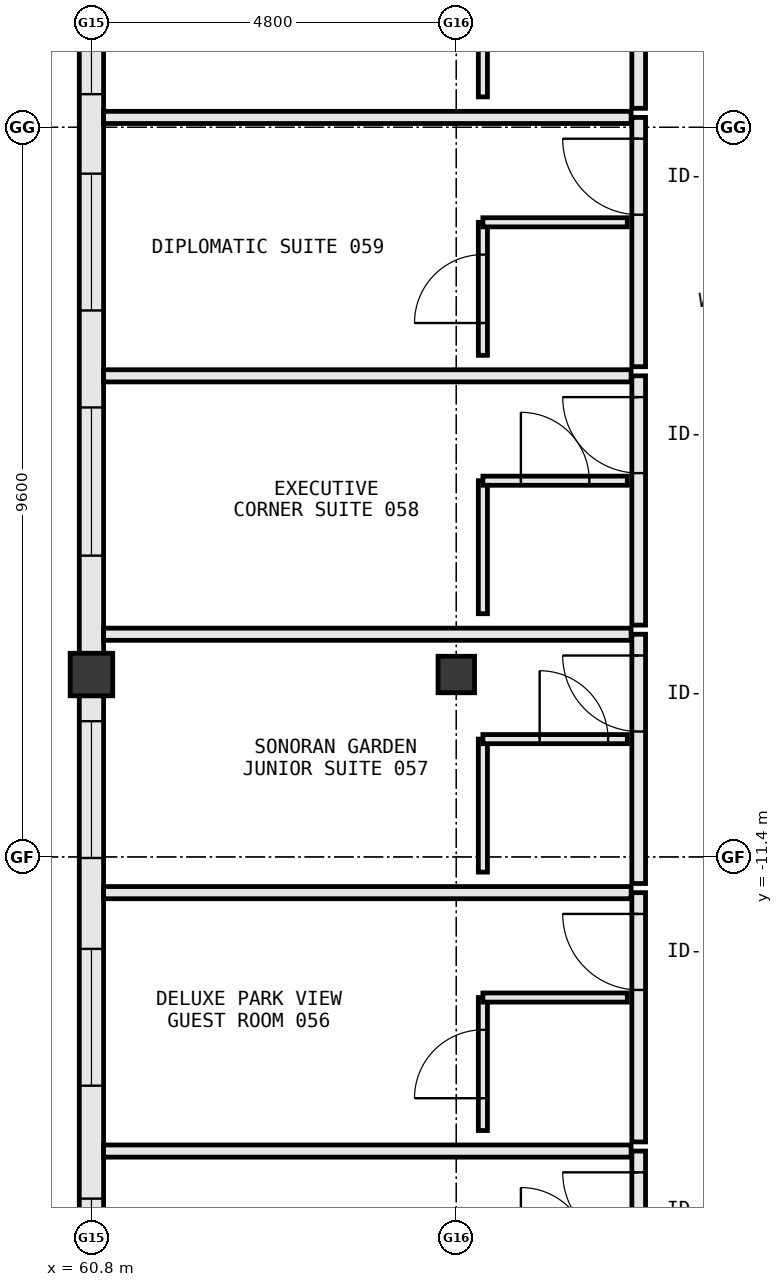
"""IFC4 building model, lengths in metres.
Left out: names, types, materials, properties, quantities, classifications, styles, units other than length and angle.
Written with IfcOpenShell. Run it as: python <this file> out.ifc"""

import sys

from ifc_helpers import new_model, si_unit, direction, frame, frame_2d, origin, origin_2d, place, context, subcontext, project, spatial, rectangle, extrude, element, fill, save


model = new_model("IFC4")
c1 = context("Model", 3, precision=1e-05, world=origin(), true_north=direction((0.0, 1.0)))
c2 = subcontext(c1, "Body", "Model", "MODEL_VIEW")
j1 = project(units=[si_unit("LENGTHUNIT", "METRE"), si_unit("PLANEANGLEUNIT", "RADIAN")], contexts=[c1])
p1 = place(None, origin())
s1 = spatial("IfcSite", under=j1, at=p1, CompositionType="ELEMENT")
p2 = place(p1, origin())
s2 = spatial("IfcBuilding", under=s1, at=p2, CompositionType="ELEMENT")
p3 = place(p2, frame((0.0, 0.0, 16.2)))
s3 = spatial("IfcBuildingStorey", under=s2, at=p3, CompositionType="ELEMENT", Elevation=16.2)
p4 = place(p3, frame((60.8, -9.0, 0.0), z_axis=(0.0, 0.0, 1.0), x_axis=(1.0, 0.0, 0.0)))
e1 = element("IfcColumn", 1, at=p4, inside=s3, PredefinedType="COLUMN", context=c2, shape_type="SweptSolid", body=[
    extrude(rectangle(XDim=0.56, YDim=0.56, at=origin_2d()), origin(), (0.0, 0.0, 1.0), 3.8),
])
p5 = place(p3, frame((65.6, -9.0, 0.0), z_axis=(0.0, 0.0, 1.0), x_axis=(1.0, 0.0, 0.0)))
e2 = element("IfcColumn", 2, at=p5, inside=s3, PredefinedType="COLUMN", context=c2, shape_type="SweptSolid", body=[
    extrude(rectangle(XDim=0.48, YDim=0.48, at=origin_2d()), origin(), (0.0, 0.0, 1.0), 3.8),
])
p6 = place(p3, frame((60.8, 0.322, 0.0), z_axis=(0.0, 0.0, 1.0), x_axis=(0.0, -1.0, 0.0)))
e3 = element("IfcWall", 3, at=p6, inside=s3, PredefinedType="STANDARD", context=c2, shape_type="SweptSolid", body=[
    extrude(rectangle(XDim=9.044, YDim=0.32, at=frame_2d((4.522, 0.0))), origin(), (0.0, 0.0, 1.0), 2.915),
])
p7 = place(p6, frame((5.808, 0.0, 0.85)))
e4 = element("IfcOpeningElement", 4, at=p7, cuts=e3, PredefinedType="OPENING", context=c2, shape_type="SweptSolid", body=[
    extrude(rectangle(XDim=1.95, YDim=1.9, at=frame_2d((0.975, 0.95))), frame((0.0, 0.172, 0.0), z_axis=(0.0, -1.0, 0.0), x_axis=(1.0, 0.0, 0.0)), (0.0, 0.0, 1.0), 0.344),
])
p8 = place(p6, frame((2.732, 0.0, 0.85)))
e5 = element("IfcOpeningElement", 5, at=p8, cuts=e3, PredefinedType="OPENING", context=c2, shape_type="SweptSolid", body=[
    extrude(rectangle(XDim=1.8, YDim=1.85, at=frame_2d((0.9, 0.925))), frame((0.0, 0.172, 0.0), z_axis=(0.0, -1.0, 0.0), x_axis=(1.0, 0.0, 0.0)), (0.0, 0.0, 1.0), 0.344),
])
p9 = place(p6, frame((0.186, 0.0, 0.85)))
e6 = element("IfcOpeningElement", 6, at=p9, cuts=e3, PredefinedType="OPENING", context=c2, shape_type="SweptSolid", body=[
    extrude(rectangle(XDim=1.5, YDim=1.75, at=frame_2d((0.75, 0.875))), frame((0.0, 0.172, 0.0), z_axis=(0.0, -1.0, 0.0), x_axis=(1.0, 0.0, 0.0)), (0.0, 0.0, 1.0), 0.344),
])
p10 = place(p3, frame((60.8, -9.278, 0.0), z_axis=(0.0, 0.0, 1.0), x_axis=(0.0, -1.0, 0.0)))
e7 = element("IfcWall", 7, at=p10, inside=s3, PredefinedType="STANDARD", context=c2, shape_type="SweptSolid", body=[
    extrude(rectangle(XDim=9.044, YDim=0.32, at=frame_2d((4.522, 0.0))), origin(), (0.0, 0.0, 1.0), 2.915),
])
p11 = place(p10, frame((6.618, 0.0, 0.85)))
e8 = element("IfcOpeningElement", 8, at=p11, cuts=e7, PredefinedType="OPENING", context=c2, shape_type="SweptSolid", body=[
    extrude(rectangle(XDim=1.8, YDim=1.85, at=frame_2d((0.9, 0.925))), frame((0.0, 0.172, 0.0), z_axis=(0.0, -1.0, 0.0), x_axis=(1.0, 0.0, 0.0)), (0.0, 0.0, 1.0), 0.344),
])
p12 = place(p10, frame((3.332, 0.0, 0.85)))
e9 = element("IfcOpeningElement", 9, at=p12, cuts=e7, PredefinedType="OPENING", context=c2, shape_type="SweptSolid", body=[
    extrude(rectangle(XDim=1.8, YDim=1.85, at=frame_2d((0.9, 0.925))), frame((0.0, 0.172, 0.0), z_axis=(0.0, -1.0, 0.0), x_axis=(1.0, 0.0, 0.0)), (0.0, 0.0, 1.0), 0.344),
])
p13 = place(p10, frame((0.336, 0.0, 0.85)))
e10 = element("IfcOpeningElement", 10, at=p13, cuts=e7, PredefinedType="OPENING", context=c2, shape_type="SweptSolid", body=[
    extrude(rectangle(XDim=1.8, YDim=1.85, at=frame_2d((0.9, 0.925))), frame((0.0, 0.172, 0.0), z_axis=(0.0, -1.0, 0.0), x_axis=(1.0, 0.0, 0.0)), (0.0, 0.0, 1.0), 0.344),
])
p14 = place(p3, frame((68.0, -18.55, 0.0), z_axis=(0.0, 0.0, 1.0), x_axis=(0.0, 1.0, 0.0)))
e11 = element("IfcWall", 11, at=p14, inside=s3, PredefinedType="PARTITIONING", context=c2, shape_type="SweptSolid", body=[
    extrude(rectangle(XDim=3.28, YDim=0.18, at=frame_2d((1.64, 0.0))), origin(), (0.0, 0.0, 1.0), 3.56),
])
p15 = place(p14, frame((2.0, 0.0, 0.0)))
e12 = element("IfcOpeningElement", 12, at=p15, cuts=e11, PredefinedType="OPENING", context=c2, shape_type="SweptSolid", body=[
    extrude(rectangle(XDim=1.0, YDim=2.2, at=frame_2d((0.5, 1.1))), frame((0.0, 0.102, 0.0), z_axis=(0.0, -1.0, 0.0), x_axis=(1.0, 0.0, 0.0)), (0.0, 0.0, 1.0), 0.204),
])
p16 = place(p3, frame((60.96, -15.27, 0.0), z_axis=(0.0, 0.0, 1.0), x_axis=(1.0, 0.0, 0.0)))
e13 = element("IfcWall", 13, at=p16, inside=s3, PredefinedType="PARTITIONING", context=c2, shape_type="SweptSolid", body=[
    extrude(rectangle(XDim=6.94, YDim=0.16, at=frame_2d((3.47, 0.0))), origin(), (0.0, 0.0, 1.0), 3.56),
])
p17 = place(p3, frame((68.0, -15.15, 0.0), z_axis=(0.0, 0.0, 1.0), x_axis=(0.0, 1.0, 0.0)))
e14 = element("IfcWall", 14, at=p17, inside=s3, PredefinedType="PARTITIONING", context=c2, shape_type="SweptSolid", body=[
    extrude(rectangle(XDim=3.28, YDim=0.18, at=frame_2d((1.64, 0.0))), origin(), (0.0, 0.0, 1.0), 3.56),
])
p18 = place(p17, frame((2.0, 0.0, 0.0)))
e15 = element("IfcOpeningElement", 15, at=p18, cuts=e14, PredefinedType="OPENING", context=c2, shape_type="SweptSolid", body=[
    extrude(rectangle(XDim=1.0, YDim=2.2, at=frame_2d((0.5, 1.1))), frame((0.0, 0.102, 0.0), z_axis=(0.0, -1.0, 0.0), x_axis=(1.0, 0.0, 0.0)), (0.0, 0.0, 1.0), 0.204),
])
p19 = place(p3, frame((60.96, -11.87, 0.0), z_axis=(0.0, 0.0, 1.0), x_axis=(1.0, 0.0, 0.0)))
e16 = element("IfcWall", 16, at=p19, inside=s3, PredefinedType="PARTITIONING", context=c2, shape_type="SweptSolid", body=[
    extrude(rectangle(XDim=6.94, YDim=0.16, at=frame_2d((3.47, 0.0))), origin(), (0.0, 0.0, 1.0), 3.56),
])
p20 = place(p3, frame((65.95, -15.0, 0.0), z_axis=(0.0, 0.0, 1.0), x_axis=(0.0, 1.0, 0.0)))
e17 = element("IfcWall", 17, at=p20, inside=s3, PredefinedType="PARTITIONING", context=c2, shape_type="SweptSolid", body=[
    extrude(rectangle(XDim=1.75, YDim=0.12, at=frame_2d((0.875, 0.0))), origin(), (0.0, 0.0, 1.0), 2.915),
])
p21 = place(p20, frame((0.425, 0.0, 0.0)))
e18 = element("IfcOpeningElement", 18, at=p21, cuts=e17, PredefinedType="OPENING", context=c2, shape_type="SweptSolid", body=[
    extrude(rectangle(XDim=0.9, YDim=2.15, at=frame_2d((0.45, 1.075))), frame((0.0, 0.072, 0.0), z_axis=(0.0, -1.0, 0.0), x_axis=(1.0, 0.0, 0.0)), (0.0, 0.0, 1.0), 0.144),
])
p22 = place(p3, frame((65.95, -13.25, 0.0), z_axis=(0.0, 0.0, 1.0), x_axis=(1.0, 0.0, 0.0)))
e19 = element("IfcWall", 19, at=p22, inside=s3, PredefinedType="PARTITIONING", context=c2, shape_type="SweptSolid", body=[
    extrude(rectangle(XDim=1.9, YDim=0.12, at=frame_2d((0.95, 0.0))), origin(), (0.0, 0.0, 1.0), 3.56),
])
p23 = place(p3, frame((68.0, -11.75, 0.0), z_axis=(0.0, 0.0, 1.0), x_axis=(0.0, 1.0, 0.0)))
e20 = element("IfcWall", 20, at=p23, inside=s3, PredefinedType="PARTITIONING", context=c2, shape_type="SweptSolid", body=[
    extrude(rectangle(XDim=3.28, YDim=0.18, at=frame_2d((1.64, 0.0))), origin(), (0.0, 0.0, 1.0), 3.56),
])
p24 = place(p23, frame((2.0, 0.0, 0.0)))
e21 = element("IfcOpeningElement", 21, at=p24, cuts=e20, PredefinedType="OPENING", context=c2, shape_type="SweptSolid", body=[
    extrude(rectangle(XDim=1.0, YDim=2.2, at=frame_2d((0.5, 1.1))), frame((0.0, 0.102, 0.0), z_axis=(0.0, -1.0, 0.0), x_axis=(1.0, 0.0, 0.0)), (0.0, 0.0, 1.0), 0.204),
])
p25 = place(p3, frame((60.96, -8.47, 0.0), z_axis=(0.0, 0.0, 1.0), x_axis=(1.0, 0.0, 0.0)))
e22 = element("IfcWall", 22, at=p25, inside=s3, PredefinedType="PARTITIONING", context=c2, shape_type="SweptSolid", body=[
    extrude(rectangle(XDim=6.94, YDim=0.16, at=frame_2d((3.47, 0.0))), origin(), (0.0, 0.0, 1.0), 3.56),
])
p26 = place(p3, frame((65.95, -11.6, 0.0), z_axis=(0.0, 0.0, 1.0), x_axis=(0.0, 1.0, 0.0)))
e23 = element("IfcWall", 23, at=p26, inside=s3, PredefinedType="PARTITIONING", context=c2, shape_type="SweptSolid", body=[
    extrude(rectangle(XDim=1.75, YDim=0.12, at=frame_2d((0.875, 0.0))), origin(), (0.0, 0.0, 1.0), 2.915),
])
p27 = place(p3, frame((65.95, -9.85, 0.0), z_axis=(0.0, 0.0, 1.0), x_axis=(1.0, 0.0, 0.0)))
e24 = element("IfcWall", 24, at=p27, inside=s3, PredefinedType="PARTITIONING", context=c2, shape_type="SweptSolid", body=[
    extrude(rectangle(XDim=1.9, YDim=0.12, at=frame_2d((0.95, 0.0))), origin(), (0.0, 0.0, 1.0), 3.56),
])
p28 = place(p27, frame((0.747, 0.0, 0.0)))
e25 = element("IfcOpeningElement", 25, at=p28, cuts=e24, PredefinedType="OPENING", context=c2, shape_type="SweptSolid", body=[
    extrude(rectangle(XDim=0.9, YDim=2.15, at=frame_2d((0.45, 1.075))), frame((0.0, 0.072, 0.0), z_axis=(0.0, -1.0, 0.0), x_axis=(1.0, 0.0, 0.0)), (0.0, 0.0, 1.0), 0.144),
])
p29 = place(p3, frame((68.0, -8.35, 0.0), z_axis=(0.0, 0.0, 1.0), x_axis=(0.0, 1.0, 0.0)))
e26 = element("IfcWall", 26, at=p29, inside=s3, PredefinedType="PARTITIONING", context=c2, shape_type="SweptSolid", body=[
    extrude(rectangle(XDim=3.28, YDim=0.18, at=frame_2d((1.64, 0.0))), origin(), (0.0, 0.0, 1.0), 3.56),
])
p30 = place(p29, frame((2.0, 0.0, 0.0)))
e27 = element("IfcOpeningElement", 27, at=p30, cuts=e26, PredefinedType="OPENING", context=c2, shape_type="SweptSolid", body=[
    extrude(rectangle(XDim=1.0, YDim=2.2, at=frame_2d((0.5, 1.1))), frame((0.0, 0.102, 0.0), z_axis=(0.0, -1.0, 0.0), x_axis=(1.0, 0.0, 0.0)), (0.0, 0.0, 1.0), 0.204),
])
p31 = place(p3, frame((60.96, -5.07, 0.0), z_axis=(0.0, 0.0, 1.0), x_axis=(1.0, 0.0, 0.0)))
e28 = element("IfcWall", 28, at=p31, inside=s3, PredefinedType="PARTITIONING", context=c2, shape_type="SweptSolid", body=[
    extrude(rectangle(XDim=6.94, YDim=0.16, at=frame_2d((3.47, 0.0))), origin(), (0.0, 0.0, 1.0), 3.56),
])
p32 = place(p3, frame((65.95, -8.2, 0.0), z_axis=(0.0, 0.0, 1.0), x_axis=(0.0, 1.0, 0.0)))
e29 = element("IfcWall", 29, at=p32, inside=s3, PredefinedType="PARTITIONING", context=c2, shape_type="SweptSolid", body=[
    extrude(rectangle(XDim=1.75, YDim=0.12, at=frame_2d((0.875, 0.0))), origin(), (0.0, 0.0, 1.0), 2.915),
])
p33 = place(p3, frame((65.95, -6.45, 0.0), z_axis=(0.0, 0.0, 1.0), x_axis=(1.0, 0.0, 0.0)))
e30 = element("IfcWall", 30, at=p33, inside=s3, PredefinedType="PARTITIONING", context=c2, shape_type="SweptSolid", body=[
    extrude(rectangle(XDim=1.9, YDim=0.12, at=frame_2d((0.95, 0.0))), origin(), (0.0, 0.0, 1.0), 3.56),
])
p34 = place(p33, frame((0.5, 0.0, 0.0)))
e31 = element("IfcOpeningElement", 31, at=p34, cuts=e30, PredefinedType="OPENING", context=c2, shape_type="SweptSolid", body=[
    extrude(rectangle(XDim=0.9, YDim=2.15, at=frame_2d((0.45, 1.075))), frame((0.0, 0.072, 0.0), z_axis=(0.0, -1.0, 0.0), x_axis=(1.0, 0.0, 0.0)), (0.0, 0.0, 1.0), 0.144),
])
p35 = place(p3, frame((68.0, -4.95, 0.0), z_axis=(0.0, 0.0, 1.0), x_axis=(0.0, 1.0, 0.0)))
e32 = element("IfcWall", 32, at=p35, inside=s3, PredefinedType="PARTITIONING", context=c2, shape_type="SweptSolid", body=[
    extrude(rectangle(XDim=3.28, YDim=0.18, at=frame_2d((1.64, 0.0))), origin(), (0.0, 0.0, 1.0), 3.56),
])
p36 = place(p35, frame((2.0, 0.0, 0.0)))
e33 = element("IfcOpeningElement", 33, at=p36, cuts=e32, PredefinedType="OPENING", context=c2, shape_type="SweptSolid", body=[
    extrude(rectangle(XDim=1.0, YDim=2.2, at=frame_2d((0.5, 1.1))), frame((0.0, 0.102, 0.0), z_axis=(0.0, -1.0, 0.0), x_axis=(1.0, 0.0, 0.0)), (0.0, 0.0, 1.0), 0.204),
])
p37 = place(p3, frame((60.96, -1.67, 0.0), z_axis=(0.0, 0.0, 1.0), x_axis=(1.0, 0.0, 0.0)))
e34 = element("IfcWall", 34, at=p37, inside=s3, PredefinedType="PARTITIONING", context=c2, shape_type="SweptSolid", body=[
    extrude(rectangle(XDim=6.94, YDim=0.16, at=frame_2d((3.47, 0.0))), origin(), (0.0, 0.0, 1.0), 3.56),
])
p38 = place(p3, frame((65.95, -4.8, 0.0), z_axis=(0.0, 0.0, 1.0), x_axis=(0.0, 1.0, 0.0)))
e35 = element("IfcWall", 35, at=p38, inside=s3, PredefinedType="PARTITIONING", context=c2, shape_type="SweptSolid", body=[
    extrude(rectangle(XDim=1.75, YDim=0.12, at=frame_2d((0.875, 0.0))), origin(), (0.0, 0.0, 1.0), 2.915),
])
p39 = place(p38, frame((0.425, 0.0, 0.0)))
e36 = element("IfcOpeningElement", 36, at=p39, cuts=e35, PredefinedType="OPENING", context=c2, shape_type="SweptSolid", body=[
    extrude(rectangle(XDim=0.9, YDim=2.15, at=frame_2d((0.45, 1.075))), frame((0.0, 0.072, 0.0), z_axis=(0.0, -1.0, 0.0), x_axis=(1.0, 0.0, 0.0)), (0.0, 0.0, 1.0), 0.144),
])
p40 = place(p3, frame((65.95, -3.05, 0.0), z_axis=(0.0, 0.0, 1.0), x_axis=(1.0, 0.0, 0.0)))
e37 = element("IfcWall", 37, at=p40, inside=s3, PredefinedType="PARTITIONING", context=c2, shape_type="SweptSolid", body=[
    extrude(rectangle(XDim=1.9, YDim=0.12, at=frame_2d((0.95, 0.0))), origin(), (0.0, 0.0, 1.0), 3.56),
])
p41 = place(p3, frame((68.0, -1.55, 0.0), z_axis=(0.0, 0.0, 1.0), x_axis=(0.0, 1.0, 0.0)))
e38 = element("IfcWall", 38, at=p41, inside=s3, PredefinedType="PARTITIONING", context=c2, shape_type="SweptSolid", body=[
    extrude(rectangle(XDim=3.28, YDim=0.18, at=frame_2d((1.64, 0.0))), origin(), (0.0, 0.0, 1.0), 3.56),
])
p42 = place(p41, frame((2.0, 0.0, 0.0)))
e39 = element("IfcOpeningElement", 39, at=p42, cuts=e38, PredefinedType="OPENING", context=c2, shape_type="SweptSolid", body=[
    extrude(rectangle(XDim=1.0, YDim=2.2, at=frame_2d((0.5, 1.1))), frame((0.0, 0.102, 0.0), z_axis=(0.0, -1.0, 0.0), x_axis=(1.0, 0.0, 0.0)), (0.0, 0.0, 1.0), 0.204),
])
p43 = place(p3, frame((65.95, -1.4, 0.0), z_axis=(0.0, 0.0, 1.0), x_axis=(0.0, 1.0, 0.0)))
e40 = element("IfcWall", 40, at=p43, inside=s3, PredefinedType="PARTITIONING", context=c2, shape_type="SweptSolid", body=[
    extrude(rectangle(XDim=1.75, YDim=0.12, at=frame_2d((0.875, 0.0))), origin(), (0.0, 0.0, 1.0), 2.915),
])
p44 = place(p7, origin())
e41 = element("IfcWindow", 41, at=p44, inside=s3, PartitioningType="DOUBLE_PANEL_VERTICAL", PredefinedType="WINDOW", context=c2, shape_type="SweptSolid", body=[
    extrude(rectangle(XDim=1.95, YDim=1.9, at=frame_2d((0.975, 0.95))), frame((0.0, 0.03, 0.0), z_axis=(0.0, -1.0, 0.0), x_axis=(1.0, 0.0, 0.0)), (0.0, 0.0, 1.0), 0.06),
])
fill(e4, e41)
p45 = place(p11, origin())
e42 = element("IfcWindow", 42, at=p45, inside=s3, PartitioningType="SINGLE_PANEL", PredefinedType="WINDOW", context=c2, shape_type="SweptSolid", body=[
    extrude(rectangle(XDim=1.8, YDim=1.85, at=frame_2d((0.9, 0.925))), frame((0.0, 0.03, 0.0), z_axis=(0.0, -1.0, 0.0), x_axis=(1.0, 0.0, 0.0)), (0.0, 0.0, 1.0), 0.06),
])
fill(e8, e42)
p46 = place(p12, origin())
e43 = element("IfcWindow", 43, at=p46, inside=s3, PartitioningType="SINGLE_PANEL", PredefinedType="WINDOW", context=c2, shape_type="SweptSolid", body=[
    extrude(rectangle(XDim=1.8, YDim=1.85, at=frame_2d((0.9, 0.925))), frame((0.0, 0.03, 0.0), z_axis=(0.0, -1.0, 0.0), x_axis=(1.0, 0.0, 0.0)), (0.0, 0.0, 1.0), 0.06),
])
fill(e9, e43)
p47 = place(p13, origin())
e44 = element("IfcWindow", 44, at=p47, inside=s3, PartitioningType="SINGLE_PANEL", PredefinedType="WINDOW", context=c2, shape_type="SweptSolid", body=[
    extrude(rectangle(XDim=1.8, YDim=1.85, at=frame_2d((0.9, 0.925))), frame((0.0, 0.03, 0.0), z_axis=(0.0, -1.0, 0.0), x_axis=(1.0, 0.0, 0.0)), (0.0, 0.0, 1.0), 0.06),
])
fill(e10, e44)
p48 = place(p8, origin())
e45 = element("IfcWindow", 45, at=p48, inside=s3, PartitioningType="SINGLE_PANEL", PredefinedType="WINDOW", context=c2, shape_type="SweptSolid", body=[
    extrude(rectangle(XDim=1.8, YDim=1.85, at=frame_2d((0.9, 0.925))), frame((0.0, 0.03, 0.0), z_axis=(0.0, -1.0, 0.0), x_axis=(1.0, 0.0, 0.0)), (0.0, 0.0, 1.0), 0.06),
])
fill(e5, e45)
p49 = place(p9, origin())
e46 = element("IfcWindow", 46, at=p49, inside=s3, PartitioningType="SINGLE_PANEL", PredefinedType="WINDOW", context=c2, shape_type="SweptSolid", body=[
    extrude(rectangle(XDim=1.5, YDim=1.75, at=frame_2d((0.75, 0.875))), frame((0.0, 0.03, 0.0), z_axis=(0.0, -1.0, 0.0), x_axis=(1.0, 0.0, 0.0)), (0.0, 0.0, 1.0), 0.06),
])
fill(e6, e46)
p50 = place(p15, origin())
e47 = element("IfcDoor", 47, at=p50, inside=s3, OperationType="SINGLE_SWING_RIGHT", PredefinedType="DOOR", context=c2, shape_type="SweptSolid", body=[
    extrude(rectangle(XDim=1.0, YDim=2.2, at=frame_2d((0.5, 1.1))), frame((0.0, 0.025, 0.0), z_axis=(0.0, -1.0, 0.0), x_axis=(1.0, 0.0, 0.0)), (0.0, 0.0, 1.0), 0.05),
])
fill(e12, e47)
p51 = place(p18, origin())
e48 = element("IfcDoor", 48, at=p51, inside=s3, OperationType="SINGLE_SWING_RIGHT", PredefinedType="DOOR", context=c2, shape_type="SweptSolid", body=[
    extrude(rectangle(XDim=1.0, YDim=2.2, at=frame_2d((0.5, 1.1))), frame((0.0, 0.025, 0.0), z_axis=(0.0, -1.0, 0.0), x_axis=(1.0, 0.0, 0.0)), (0.0, 0.0, 1.0), 0.05),
])
fill(e15, e48)
p52 = place(p21, origin())
e49 = element("IfcDoor", 49, at=p52, inside=s3, OperationType="SINGLE_SWING_LEFT", PredefinedType="DOOR", context=c2, shape_type="SweptSolid", body=[
    extrude(rectangle(XDim=0.9, YDim=2.15, at=frame_2d((0.45, 1.075))), frame((0.0, 0.025, 0.0), z_axis=(0.0, -1.0, 0.0), x_axis=(1.0, 0.0, 0.0)), (0.0, 0.0, 1.0), 0.05),
])
fill(e18, e49)
p53 = place(p24, origin())
e50 = element("IfcDoor", 50, at=p53, inside=s3, OperationType="SINGLE_SWING_RIGHT", PredefinedType="DOOR", context=c2, shape_type="SweptSolid", body=[
    extrude(rectangle(XDim=1.0, YDim=2.2, at=frame_2d((0.5, 1.1))), frame((0.0, 0.025, 0.0), z_axis=(0.0, -1.0, 0.0), x_axis=(1.0, 0.0, 0.0)), (0.0, 0.0, 1.0), 0.05),
])
fill(e21, e50)
p54 = place(p28, origin())
e51 = element("IfcDoor", 51, at=p54, inside=s3, OperationType="SINGLE_SWING_LEFT", PredefinedType="DOOR", context=c2, shape_type="SweptSolid", body=[
    extrude(rectangle(XDim=0.9, YDim=2.15, at=frame_2d((0.45, 1.075))), frame((0.0, 0.025, 0.0), z_axis=(0.0, -1.0, 0.0), x_axis=(1.0, 0.0, 0.0)), (0.0, 0.0, 1.0), 0.05),
])
fill(e25, e51)
p55 = place(p30, origin())
e52 = element("IfcDoor", 52, at=p55, inside=s3, OperationType="SINGLE_SWING_RIGHT", PredefinedType="DOOR", context=c2, shape_type="SweptSolid", body=[
    extrude(rectangle(XDim=1.0, YDim=2.2, at=frame_2d((0.5, 1.1))), frame((0.0, 0.025, 0.0), z_axis=(0.0, -1.0, 0.0), x_axis=(1.0, 0.0, 0.0)), (0.0, 0.0, 1.0), 0.05),
])
fill(e27, e52)
p56 = place(p34, origin())
e53 = element("IfcDoor", 53, at=p56, inside=s3, OperationType="SINGLE_SWING_LEFT", PredefinedType="DOOR", context=c2, shape_type="SweptSolid", body=[
    extrude(rectangle(XDim=0.9, YDim=2.15, at=frame_2d((0.45, 1.075))), frame((0.0, 0.025, 0.0), z_axis=(0.0, -1.0, 0.0), x_axis=(1.0, 0.0, 0.0)), (0.0, 0.0, 1.0), 0.05),
])
fill(e31, e53)
p57 = place(p36, origin())
e54 = element("IfcDoor", 54, at=p57, inside=s3, OperationType="SINGLE_SWING_RIGHT", PredefinedType="DOOR", context=c2, shape_type="SweptSolid", body=[
    extrude(rectangle(XDim=1.0, YDim=2.2, at=frame_2d((0.5, 1.1))), frame((0.0, 0.025, 0.0), z_axis=(0.0, -1.0, 0.0), x_axis=(1.0, 0.0, 0.0)), (0.0, 0.0, 1.0), 0.05),
])
fill(e33, e54)
p58 = place(p39, origin())
e55 = element("IfcDoor", 55, at=p58, inside=s3, OperationType="SINGLE_SWING_LEFT", PredefinedType="DOOR", context=c2, shape_type="SweptSolid", body=[
    extrude(rectangle(XDim=0.9, YDim=2.15, at=frame_2d((0.45, 1.075))), frame((0.0, 0.025, 0.0), z_axis=(0.0, -1.0, 0.0), x_axis=(1.0, 0.0, 0.0)), (0.0, 0.0, 1.0), 0.05),
])
fill(e36, e55)
save(model, sys.argv[1])
